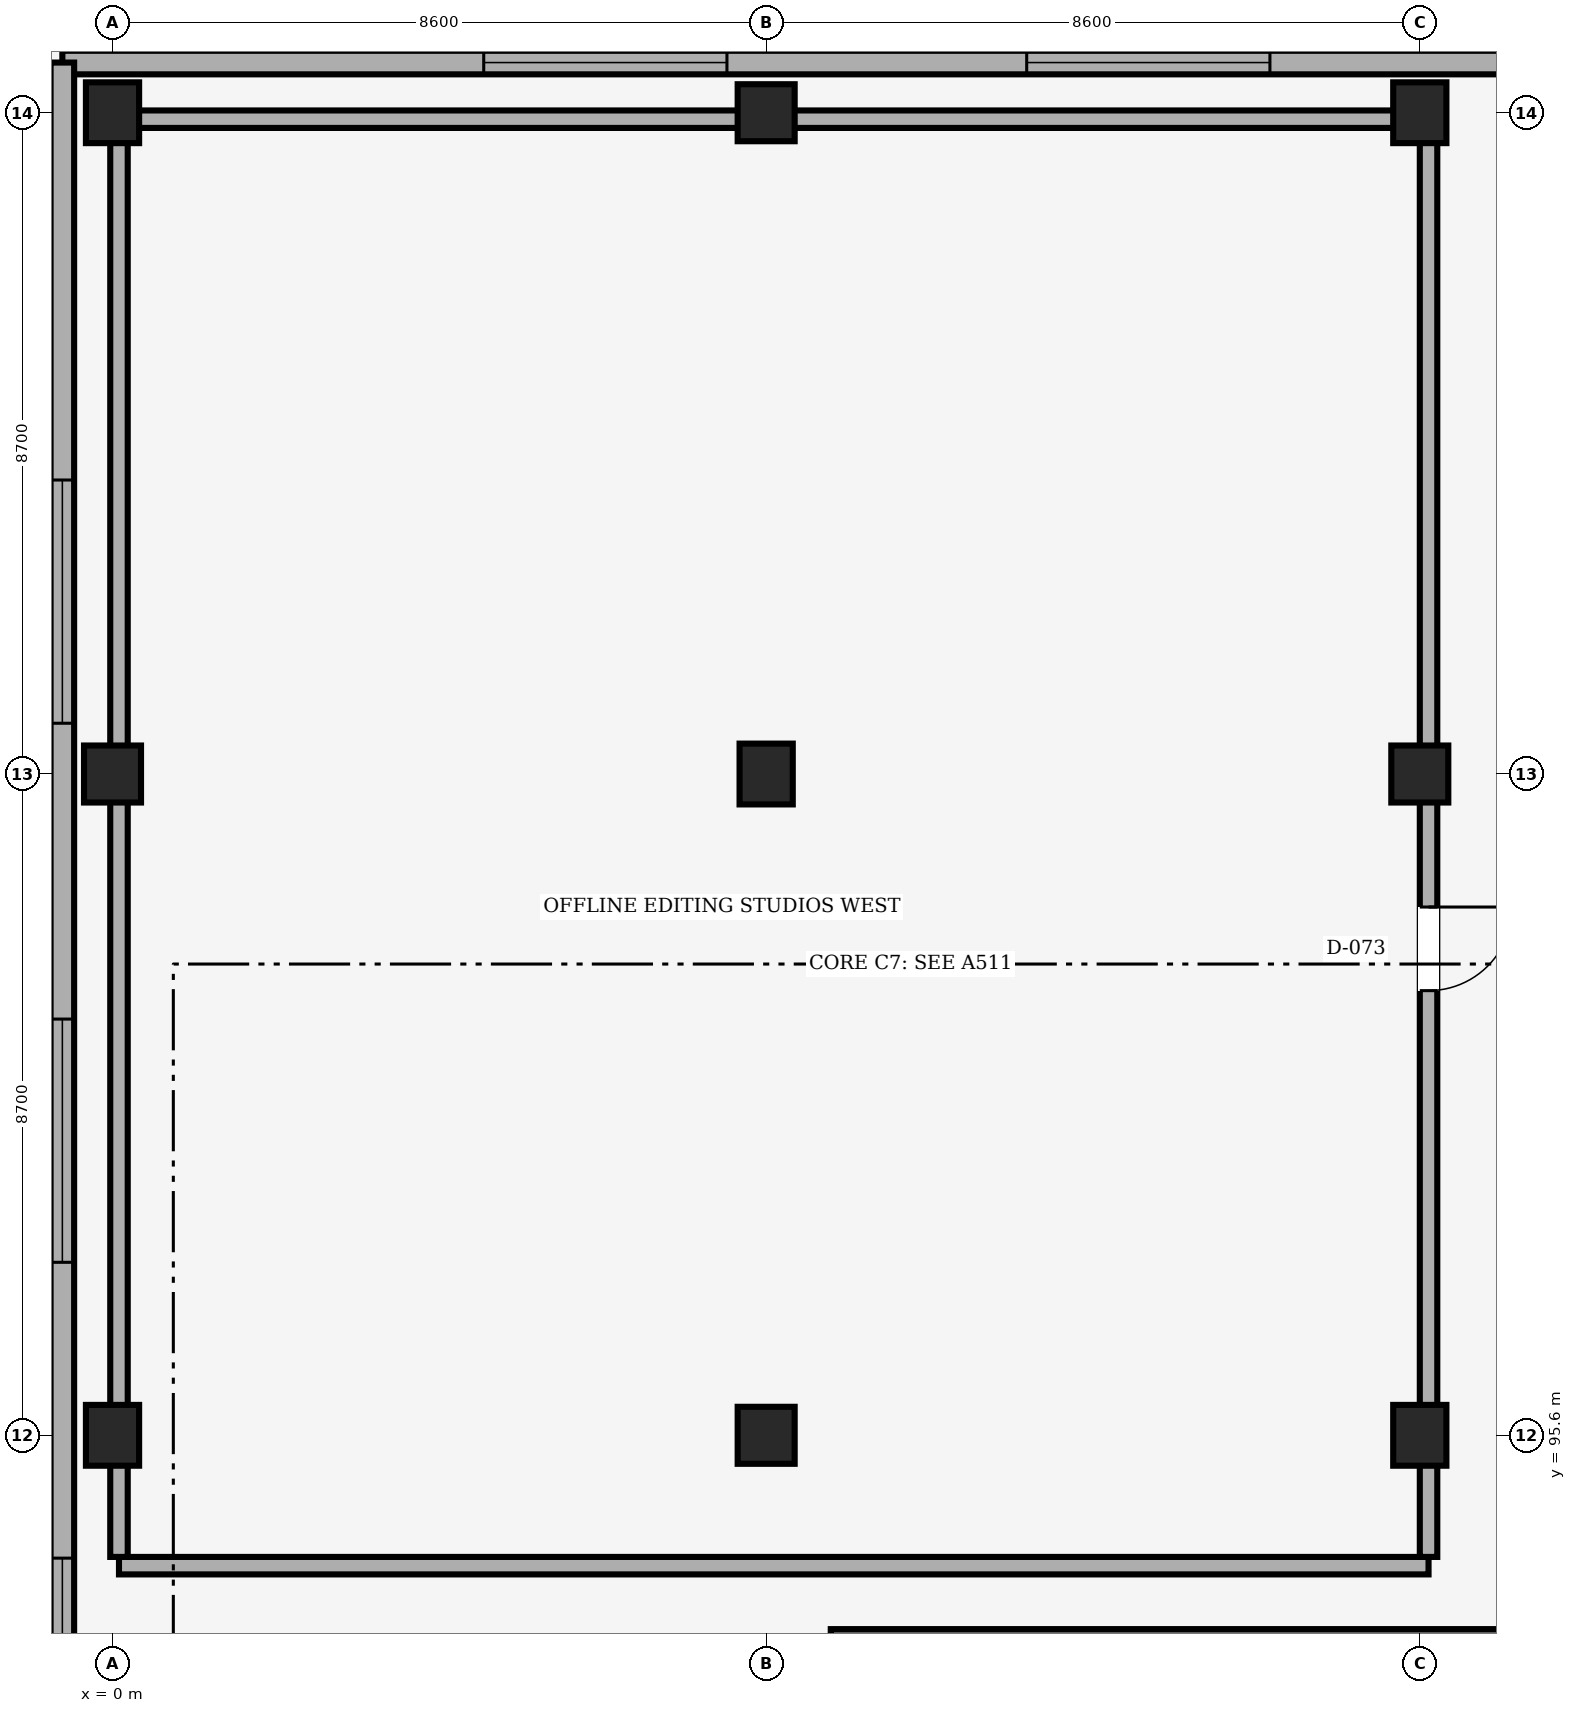
"""IFC4 building model, lengths in metres.
Left out: names, types, materials, properties, quantities, classifications, styles, units other than length and angle.
Written with IfcOpenShell. Run it as: python <this file> out.ifc"""

import sys

from ifc_helpers import new_model, si_unit, direction, frame, frame_2d, origin, origin_2d, place, context, subcontext, project, spatial, rectangle, extrude, element, fill, save


model = new_model("IFC4")
c1 = context("Model", 3, precision=1e-05, world=origin(), true_north=direction((0.0, 1.0)))
c2 = subcontext(c1, "Body", "Model", "MODEL_VIEW")
j1 = project(units=[si_unit("LENGTHUNIT", "METRE"), si_unit("PLANEANGLEUNIT", "RADIAN")], contexts=[c1])
p1 = place(None, origin())
s1 = spatial("IfcSite", under=j1, at=p1, CompositionType="ELEMENT")
p2 = place(p1, origin())
s2 = spatial("IfcBuilding", under=s1, at=p2, CompositionType="ELEMENT")
p3 = place(p2, frame((0.0, 0.0, 4.5)))
s3 = spatial("IfcBuildingStorey", under=s2, at=p3, CompositionType="ELEMENT", Elevation=4.5)
p4 = place(p3, frame((0.0, 95.6, 0.0), z_axis=(0.0, 0.0, 1.0), x_axis=(1.0, 0.0, 0.0)))
e1 = element("IfcColumn", 1, at=p4, inside=s3, PredefinedType="COLUMN", context=c2, shape_type="SweptSolid", body=[
    extrude(rectangle(XDim=0.7, YDim=0.8, at=origin_2d()), origin(), (0.0, 0.0, 1.0), 3.65),
])
p5 = place(p3, frame((0.0, 104.3, 0.0), z_axis=(0.0, 0.0, 1.0), x_axis=(1.0, 0.0, 0.0)))
e2 = element("IfcColumn", 2, at=p5, inside=s3, PredefinedType="COLUMN", context=c2, shape_type="SweptSolid", body=[
    extrude(rectangle(XDim=0.75, YDim=0.75, at=origin_2d()), origin(), (0.0, 0.0, 1.0), 3.65),
])
p6 = place(p3, frame((0.0, 113.0, 0.0), z_axis=(0.0, 0.0, 1.0), x_axis=(1.0, 0.0, 0.0)))
e3 = element("IfcColumn", 3, at=p6, inside=s3, PredefinedType="COLUMN", context=c2, shape_type="SweptSolid", body=[
    extrude(rectangle(XDim=0.7, YDim=0.8, at=origin_2d()), origin(), (0.0, 0.0, 1.0), 3.65),
])
p7 = place(p3, frame((8.6, 95.6, 0.0), z_axis=(0.0, 0.0, 1.0), x_axis=(1.0, 0.0, 0.0)))
e4 = element("IfcColumn", 4, at=p7, inside=s3, PredefinedType="COLUMN", context=c2, shape_type="SweptSolid", body=[
    extrude(rectangle(XDim=0.75, YDim=0.75, at=origin_2d()), origin(), (0.0, 0.0, 1.0), 3.65),
])
p8 = place(p3, frame((8.6, 104.3, 0.0), z_axis=(0.0, 0.0, 1.0), x_axis=(1.0, 0.0, 0.0)))
e5 = element("IfcColumn", 5, at=p8, inside=s3, PredefinedType="COLUMN", context=c2, shape_type="SweptSolid", body=[
    extrude(rectangle(XDim=0.7, YDim=0.8, at=origin_2d()), origin(), (0.0, 0.0, 1.0), 3.65),
])
p9 = place(p3, frame((8.6, 113.0, 0.0), z_axis=(0.0, 0.0, 1.0), x_axis=(1.0, 0.0, 0.0)))
e6 = element("IfcColumn", 6, at=p9, inside=s3, PredefinedType="COLUMN", context=c2, shape_type="SweptSolid", body=[
    extrude(rectangle(XDim=0.75, YDim=0.75, at=origin_2d()), origin(), (0.0, 0.0, 1.0), 3.65),
])
p10 = place(p3, frame((17.2, 95.6, 0.0), z_axis=(0.0, 0.0, 1.0), x_axis=(1.0, 0.0, 0.0)))
e7 = element("IfcColumn", 7, at=p10, inside=s3, PredefinedType="COLUMN", context=c2, shape_type="SweptSolid", body=[
    extrude(rectangle(XDim=0.7, YDim=0.8, at=origin_2d()), origin(), (0.0, 0.0, 1.0), 3.65),
])
p11 = place(p3, frame((17.2, 104.3, 0.0), z_axis=(0.0, 0.0, 1.0), x_axis=(1.0, 0.0, 0.0)))
e8 = element("IfcColumn", 8, at=p11, inside=s3, PredefinedType="COLUMN", context=c2, shape_type="SweptSolid", body=[
    extrude(rectangle(XDim=0.75, YDim=0.75, at=origin_2d()), origin(), (0.0, 0.0, 1.0), 3.65),
])
p12 = place(p3, frame((17.2, 113.0, 0.0), z_axis=(0.0, 0.0, 1.0), x_axis=(1.0, 0.0, 0.0)))
e9 = element("IfcColumn", 9, at=p12, inside=s3, PredefinedType="COLUMN", context=c2, shape_type="SweptSolid", body=[
    extrude(rectangle(XDim=0.7, YDim=0.8, at=origin_2d()), origin(), (0.0, 0.0, 1.0), 3.65),
])
p13 = place(p3, frame((-0.66, 113.66, 0.0), z_axis=(0.0, 0.0, 1.0), x_axis=(1.0, 0.0, 0.0)))
e10 = element("IfcWall", 10, at=p13, inside=s3, PredefinedType="SOLIDWALL", context=c2, shape_type="SweptSolid", body=[
    extrude(rectangle(XDim=35.72, YDim=0.31, at=frame_2d((17.86, 0.0))), origin(), (0.0, 0.0, 1.0), 3.9),
])
p14 = place(p13, frame((5.544, 0.0, 1.55)))
e11 = element("IfcOpeningElement", 11, at=p14, cuts=e10, PredefinedType="OPENING", context=c2, shape_type="SweptSolid", body=[
    extrude(rectangle(XDim=3.2, YDim=0.7, at=frame_2d((1.6, 0.35))), frame((0.0, 0.155, 0.0), z_axis=(0.0, -1.0, 0.0), x_axis=(1.0, 0.0, 0.0)), (0.0, 0.0, 1.0), 0.31),
])
p15 = place(p13, frame((12.688, 0.0, 1.55)))
e12 = element("IfcOpeningElement", 12, at=p15, cuts=e10, PredefinedType="OPENING", context=c2, shape_type="SweptSolid", body=[
    extrude(rectangle(XDim=3.2, YDim=0.7, at=frame_2d((1.6, 0.35))), frame((0.0, 0.155, 0.0), z_axis=(0.0, -1.0, 0.0), x_axis=(1.0, 0.0, 0.0)), (0.0, 0.0, 1.0), 0.31),
])
p16 = place(p13, frame((19.832, 0.0, 1.55)))
e13 = element("IfcOpeningElement", 13, at=p16, cuts=e10, PredefinedType="OPENING", context=c2, shape_type="SweptSolid", body=[
    extrude(rectangle(XDim=3.2, YDim=0.7, at=frame_2d((1.6, 0.35))), frame((0.0, 0.155, 0.0), z_axis=(0.0, -1.0, 0.0), x_axis=(1.0, 0.0, 0.0)), (0.0, 0.0, 1.0), 0.31),
])
p17 = place(p13, frame((26.976, 0.0, 1.55)))
e14 = element("IfcOpeningElement", 14, at=p17, cuts=e10, PredefinedType="OPENING", context=c2, shape_type="SweptSolid", body=[
    extrude(rectangle(XDim=3.2, YDim=0.7, at=frame_2d((1.6, 0.35))), frame((0.0, 0.155, 0.0), z_axis=(0.0, -1.0, 0.0), x_axis=(1.0, 0.0, 0.0)), (0.0, 0.0, 1.0), 0.31),
])
p18 = place(p3, frame((-0.66, 113.66, 0.0), z_axis=(0.0, 0.0, 1.0), x_axis=(0.0, -1.0, 0.0)))
e15 = element("IfcWall", 15, at=p18, inside=s3, PredefinedType="SOLIDWALL", context=c2, shape_type="SweptSolid", body=[
    extrude(rectangle(XDim=35.46, YDim=0.31, at=frame_2d((17.73, 0.0))), origin(), (0.0, 0.0, 1.0), 3.9),
])
p19 = place(p18, frame((5.492, 0.0, 1.55)))
e16 = element("IfcOpeningElement", 16, at=p19, cuts=e15, PredefinedType="OPENING", context=c2, shape_type="SweptSolid", body=[
    extrude(rectangle(XDim=3.2, YDim=0.7, at=frame_2d((1.6, 0.35))), frame((0.0, 0.155, 0.0), z_axis=(0.0, -1.0, 0.0), x_axis=(1.0, 0.0, 0.0)), (0.0, 0.0, 1.0), 0.31),
])
p20 = place(p18, frame((12.584, 0.0, 1.55)))
e17 = element("IfcOpeningElement", 17, at=p20, cuts=e15, PredefinedType="OPENING", context=c2, shape_type="SweptSolid", body=[
    extrude(rectangle(XDim=3.2, YDim=0.7, at=frame_2d((1.6, 0.35))), frame((0.0, 0.155, 0.0), z_axis=(0.0, -1.0, 0.0), x_axis=(1.0, 0.0, 0.0)), (0.0, 0.0, 1.0), 0.31),
])
p21 = place(p18, frame((19.676, 0.0, 1.55)))
e18 = element("IfcOpeningElement", 18, at=p21, cuts=e15, PredefinedType="OPENING", context=c2, shape_type="SweptSolid", body=[
    extrude(rectangle(XDim=3.2, YDim=0.7, at=frame_2d((1.6, 0.35))), frame((0.0, 0.155, 0.0), z_axis=(0.0, -1.0, 0.0), x_axis=(1.0, 0.0, 0.0)), (0.0, 0.0, 1.0), 0.31),
])
p22 = place(p18, frame((26.768, 0.0, 1.55)))
e19 = element("IfcOpeningElement", 19, at=p22, cuts=e15, PredefinedType="OPENING", context=c2, shape_type="SweptSolid", body=[
    extrude(rectangle(XDim=3.2, YDim=0.7, at=frame_2d((1.6, 0.35))), frame((0.0, 0.155, 0.0), z_axis=(0.0, -1.0, 0.0), x_axis=(1.0, 0.0, 0.0)), (0.0, 0.0, 1.0), 0.31),
])
p23 = place(p3, frame((9.45, 92.9, 0.0), z_axis=(0.0, 0.0, 1.0), x_axis=(1.0, 0.0, 0.0)))
e20 = element("IfcWall", 20, at=p23, inside=s3, PredefinedType="SHEAR", context=c2, shape_type="SweptSolid", body=[
    extrude(rectangle(XDim=10.18, YDim=0.3, at=frame_2d((5.09, 0.0))), origin(), (0.0, 0.0, 1.0), 3.65),
])
p24 = place(p3, frame((17.315, 93.885, 0.0), z_axis=(0.0, 0.0, 1.0), x_axis=(-1.0, 0.0, 0.0)))
e21 = element("IfcWall", 21, at=p24, inside=s3, PredefinedType="PARTITIONING", context=c2, shape_type="SweptSolid", body=[
    extrude(rectangle(XDim=17.23, YDim=0.23, at=frame_2d((8.615, 0.0))), origin(), (0.0, 0.0, 1.0), 3.63),
])
p25 = place(p3, frame((0.085, 94.0, 0.0), z_axis=(0.0, 0.0, 1.0), x_axis=(0.0, 1.0, 0.0)))
e22 = element("IfcWall", 22, at=p25, inside=s3, PredefinedType="PARTITIONING", context=c2, shape_type="SweptSolid", body=[
    extrude(rectangle(XDim=18.8, YDim=0.23, at=frame_2d((9.4, 0.0))), origin(), (0.0, 0.0, 1.0), 2.88),
])
p26 = place(p3, frame((0.085, 112.915, 0.0), z_axis=(0.0, 0.0, 1.0), x_axis=(1.0, 0.0, 0.0)))
e23 = element("IfcWall", 23, at=p26, inside=s3, PredefinedType="PARTITIONING", context=c2, shape_type="SweptSolid", body=[
    extrude(rectangle(XDim=17.23, YDim=0.23, at=frame_2d((8.615, 0.0))), origin(), (0.0, 0.0, 1.0), 2.98),
])
p27 = place(p3, frame((17.315, 112.8, 0.0), z_axis=(0.0, 0.0, 1.0), x_axis=(0.0, -1.0, 0.0)))
e24 = element("IfcWall", 24, at=p27, inside=s3, PredefinedType="PARTITIONING", context=c2, shape_type="SweptSolid", body=[
    extrude(rectangle(XDim=18.8, YDim=0.23, at=frame_2d((9.4, 0.0))), origin(), (0.0, 0.0, 1.0), 2.88),
])
p28 = place(p27, frame((10.25, 0.0, 0.0)))
e25 = element("IfcOpeningElement", 25, at=p28, cuts=e24, PredefinedType="OPENING", context=c2, shape_type="SweptSolid", body=[
    extrude(rectangle(XDim=1.1, YDim=2.1, at=frame_2d((0.55, 1.05))), frame((0.0, 0.115, 0.0), z_axis=(0.0, -1.0, 0.0), x_axis=(1.0, 0.0, 0.0)), (0.0, 0.0, 1.0), 0.23),
])
p29 = place(p14, origin())
e26 = element("IfcWindow", 26, at=p29, inside=s3, PartitioningType="SINGLE_PANEL", PredefinedType="WINDOW", context=c2, shape_type="SweptSolid", body=[
    extrude(rectangle(XDim=3.2, YDim=0.7, at=frame_2d((1.6, 0.35))), frame((0.0, -0.06, 0.0), z_axis=(0.0, -1.0, 0.0), x_axis=(1.0, 0.0, 0.0)), (0.0, 0.0, 1.0), 0.06),
])
fill(e11, e26)
p30 = place(p15, origin())
e27 = element("IfcWindow", 27, at=p30, inside=s3, PartitioningType="SINGLE_PANEL", PredefinedType="WINDOW", context=c2, shape_type="SweptSolid", body=[
    extrude(rectangle(XDim=3.2, YDim=0.7, at=frame_2d((1.6, 0.35))), frame((0.0, -0.06, 0.0), z_axis=(0.0, -1.0, 0.0), x_axis=(1.0, 0.0, 0.0)), (0.0, 0.0, 1.0), 0.06),
])
fill(e12, e27)
p31 = place(p19, origin())
e28 = element("IfcWindow", 28, at=p31, inside=s3, PartitioningType="SINGLE_PANEL", PredefinedType="WINDOW", context=c2, shape_type="SweptSolid", body=[
    extrude(rectangle(XDim=3.2, YDim=0.7, at=frame_2d((1.6, 0.35))), frame((0.0, -0.06, 0.0), z_axis=(0.0, -1.0, 0.0), x_axis=(1.0, 0.0, 0.0)), (0.0, 0.0, 1.0), 0.06),
])
fill(e16, e28)
p32 = place(p20, origin())
e29 = element("IfcWindow", 29, at=p32, inside=s3, PartitioningType="SINGLE_PANEL", PredefinedType="WINDOW", context=c2, shape_type="SweptSolid", body=[
    extrude(rectangle(XDim=3.2, YDim=0.7, at=frame_2d((1.6, 0.35))), frame((0.0, -0.06, 0.0), z_axis=(0.0, -1.0, 0.0), x_axis=(1.0, 0.0, 0.0)), (0.0, 0.0, 1.0), 0.06),
])
fill(e17, e29)
p33 = place(p21, origin())
e30 = element("IfcWindow", 30, at=p33, inside=s3, PartitioningType="SINGLE_PANEL", PredefinedType="WINDOW", context=c2, shape_type="SweptSolid", body=[
    extrude(rectangle(XDim=3.2, YDim=0.7, at=frame_2d((1.6, 0.35))), frame((0.0, -0.06, 0.0), z_axis=(0.0, -1.0, 0.0), x_axis=(1.0, 0.0, 0.0)), (0.0, 0.0, 1.0), 0.06),
])
fill(e18, e30)
p34 = place(p28, origin())
e31 = element("IfcDoor", 31, at=p34, inside=s3, OperationType="SINGLE_SWING_LEFT", PredefinedType="DOOR", context=c2, shape_type="SweptSolid", body=[
    extrude(rectangle(XDim=1.1, YDim=2.1, at=frame_2d((0.55, 1.05))), frame((0.0, 0.025, 0.0), z_axis=(0.0, -1.0, 0.0), x_axis=(1.0, 0.0, 0.0)), (0.0, 0.0, 1.0), 0.05),
])
fill(e25, e31)
save(model, sys.argv[1])
